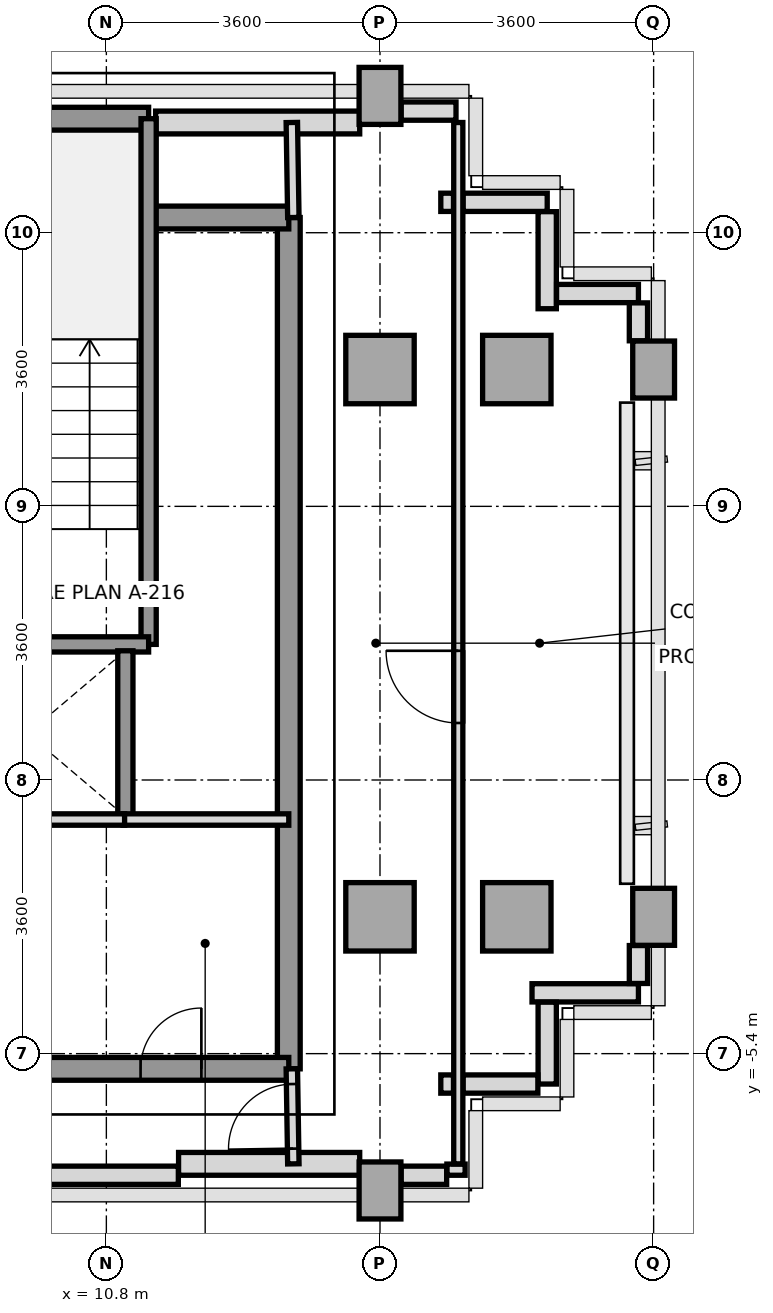
"""IFC4 building model, lengths in metres.
Left out: names, types, materials, properties, quantities, classifications, styles, units other than length and angle.
Written with IfcOpenShell. Run it as: python <this file> out.ifc"""

import sys

from ifc_helpers import new_model, si_unit, direction, frame, frame_2d, origin, origin_2d, place, context, subcontext, project, spatial, rectangle, extrude, source, transform, mapped, element, fill, save


model = new_model("IFC4")
c1 = context("Model", 3, precision=1e-05, world=origin(), true_north=direction((0.0, 1.0)))
c2 = subcontext(c1, "Body", "Model", "MODEL_VIEW")
j1 = project(units=[si_unit("LENGTHUNIT", "METRE"), si_unit("PLANEANGLEUNIT", "RADIAN")], contexts=[c1])
p1 = place(None, origin())
s1 = spatial("IfcSite", under=j1, at=p1, CompositionType="ELEMENT")
p2 = place(p1, origin())
s2 = spatial("IfcBuilding", under=s1, at=p2, CompositionType="ELEMENT")
p3 = place(p2, frame((0.0, 0.0, 233.2)))
s3 = spatial("IfcBuildingStorey", under=s2, at=p3, CompositionType="ELEMENT", Elevation=233.2)
m1 = source(origin(), c2, "Body", "SweptSolid", [
    extrude(rectangle(XDim=0.55, YDim=0.75, at=origin_2d()), origin(), (0.0, 0.0, 1.0), 3.01),
])
p4 = place(p3, frame((14.4, -7.2, 0.0), z_axis=(0.0, 0.0, 1.0), x_axis=(1.0, 0.0, 0.0)))
e1 = element("IfcColumn", 1, at=p4, inside=s3, PredefinedType="COLUMN", context=c2, shape_type="MappedRepresentation", body=[
    mapped(m1, transform((0.0, 0.0, 0.0), x_axis=(1.0, 0.0, 0.0), y_axis=(0.0, 1.0, 0.0), z_axis=(0.0, 0.0, 1.0), scale=1.0)),
])
m2 = source(origin(), c2, "Body", "SweptSolid", [
    extrude(rectangle(XDim=0.9, YDim=0.9, at=origin_2d()), origin(), (0.0, 0.0, 1.0), 3.01),
])
for number, where, z_axis, x_axis in (
    (2, (14.4, -3.6, 0.0), (0.0, 0.0, 1.0), (1.0, 0.0, 0.0)),
    (3, (14.4, 3.6, 0.0), (0.0, 0.0, 1.0), (1.0, 0.0, 0.0)),
):
    element("IfcColumn", number, at=place(p3, frame(where, z_axis=z_axis, x_axis=x_axis)), inside=s3, PredefinedType="COLUMN", context=c2, shape_type="MappedRepresentation", body=[
        mapped(m2, transform((0.0, 0.0, 0.0), x_axis=(1.0, 0.0, 0.0), y_axis=(0.0, 1.0, 0.0), z_axis=(0.0, 0.0, 1.0), scale=1.0)),
    ])
p5 = place(p3, frame((14.4, 7.2, 0.0), z_axis=(0.0, 0.0, 1.0), x_axis=(1.0, 0.0, 0.0)))
e4 = element("IfcColumn", 4, at=p5, inside=s3, PredefinedType="COLUMN", context=c2, shape_type="MappedRepresentation", body=[
    mapped(m1, transform((0.0, 0.0, 0.0), x_axis=(1.0, 0.0, 0.0), y_axis=(0.0, 1.0, 0.0), z_axis=(0.0, 0.0, 1.0), scale=1.0)),
])
for number, where, z_axis, x_axis in (
    (5, (16.2, -3.6, 0.0), (0.0, 0.0, 1.0), (1.0, 0.0, 0.0)),
    (6, (16.2, 3.6, 0.0), (0.0, 0.0, 1.0), (1.0, 0.0, 0.0)),
):
    element("IfcColumn", number, at=place(p3, frame(where, z_axis=z_axis, x_axis=x_axis)), inside=s3, PredefinedType="COLUMN", context=c2, shape_type="MappedRepresentation", body=[
        mapped(m2, transform((0.0, 0.0, 0.0), x_axis=(1.0, 0.0, 0.0), y_axis=(0.0, 1.0, 0.0), z_axis=(0.0, 0.0, 1.0), scale=1.0)),
    ])
for number, where, z_axis, x_axis in (
    (7, (18.0, -3.6, 0.0), (0.0, 0.0, 1.0), (1.0, 0.0, 0.0)),
    (8, (18.0, 3.6, 0.0), (0.0, 0.0, 1.0), (1.0, 0.0, 0.0)),
):
    element("IfcColumn", number, at=place(p3, frame(where, z_axis=z_axis, x_axis=x_axis)), inside=s3, PredefinedType="COLUMN", context=c2, shape_type="MappedRepresentation", body=[
        mapped(m1, transform((0.0, 0.0, 0.0), x_axis=(1.0, 0.0, 0.0), y_axis=(0.0, 1.0, 0.0), z_axis=(0.0, 0.0, 1.0), scale=1.0)),
    ])
p6 = place(p3, frame((11.448, 6.85, 0.0), z_axis=(0.0, 0.0, 1.0), x_axis=(1.0, 0.0, 0.0)))
e9 = element("IfcWall", 9, at=p6, inside=s3, PredefinedType="SOLIDWALL", context=c2, shape_type="SweptSolid", body=[
    extrude(rectangle(XDim=2.685, YDim=0.3, at=frame_2d((1.343, 0.0))), origin(), (0.0, 0.0, 1.0), 2.57),
])
p7 = place(p3, frame((11.75, -6.85, 0.0), z_axis=(0.0, 0.0, 1.0), x_axis=(1.0, 0.0, 0.0)))
e10 = element("IfcWall", 10, at=p7, inside=s3, PredefinedType="SOLIDWALL", context=c2, shape_type="SweptSolid", body=[
    extrude(rectangle(XDim=2.383, YDim=0.3, at=frame_2d((1.191, 0.0))), origin(), (0.0, 0.0, 1.0), 2.57),
])
p8 = place(p3, frame((17.8, -4.6, 0.0), z_axis=(0.0, 0.0, 1.0), x_axis=(-1.0, 0.0, 0.0)))
e11 = element("IfcWall", 11, at=p8, inside=s3, PredefinedType="PARAPET", context=c2, shape_type="SweptSolid", body=[
    extrude(rectangle(XDim=1.4, YDim=0.24, at=frame_2d((0.7, 0.0))), origin(), (0.0, 0.0, 1.0), 1.15),
])
p9 = place(p3, frame((16.6, -4.723, 0.0), z_axis=(0.0, 0.0, 1.0), x_axis=(0.0, -1.0, 0.0)))
e12 = element("IfcWall", 12, at=p9, inside=s3, PredefinedType="PARAPET", context=c2, shape_type="SweptSolid", body=[
    extrude(rectangle(XDim=1.077, YDim=0.24, at=frame_2d((0.539, 0.0))), origin(), (0.0, 0.0, 1.0), 1.15),
])
p10 = place(p3, frame((16.477, -5.8, 0.0), z_axis=(0.0, 0.0, 1.0), x_axis=(-1.0, 0.0, 0.0)))
e13 = element("IfcWall", 13, at=p10, inside=s3, PredefinedType="PARAPET", context=c2, shape_type="SweptSolid", body=[
    extrude(rectangle(XDim=0.984, YDim=0.24, at=frame_2d((0.492, 0.0))), origin(), (0.0, 0.0, 1.0), 1.15),
])
p11 = place(p3, frame((15.367, -5.8, 0.0), z_axis=(0.0, 0.0, 1.0), x_axis=(-1.0, 0.0, 0.0)))
e14 = element("IfcWall", 14, at=p11, inside=s3, PredefinedType="PARAPET", context=c2, shape_type="SweptSolid", body=[
    extrude(rectangle(XDim=0.167, YDim=0.24, at=frame_2d((0.083, 0.0))), origin(), (0.0, 0.0, 1.0), 1.15),
])
p12 = place(p3, frame((15.4, -6.853, 0.0), z_axis=(0.0, 0.0, 1.0), x_axis=(0.0, -1.0, 0.0)))
e15 = element("IfcWall", 15, at=p12, inside=s3, PredefinedType="PARAPET", context=c2, shape_type="SweptSolid", body=[
    extrude(rectangle(XDim=0.147, YDim=0.24, at=frame_2d((0.073, 0.0))), origin(), (0.0, 0.0, 1.0), 1.15),
])
p13 = place(p3, frame((15.277, -7.0, 0.0), z_axis=(0.0, 0.0, 1.0), x_axis=(-1.0, 0.0, 0.0)))
e16 = element("IfcWall", 16, at=p13, inside=s3, PredefinedType="PARAPET", context=c2, shape_type="SweptSolid", body=[
    extrude(rectangle(XDim=0.599, YDim=0.24, at=frame_2d((0.3, 0.0))), origin(), (0.0, 0.0, 1.0), 1.15),
])
p14 = place(p3, frame((11.747, -7.0, 0.0), z_axis=(0.0, 0.0, 1.0), x_axis=(-1.0, 0.0, 0.0)))
e17 = element("IfcWall", 17, at=p14, inside=s3, PredefinedType="PARAPET", context=c2, shape_type="SweptSolid", body=[
    extrude(rectangle(XDim=2.469, YDim=0.24, at=frame_2d((1.234, 0.0))), origin(), (0.0, 0.0, 1.0), 1.15),
])
p15 = place(p3, frame((14.678, 7.0, 0.0), z_axis=(0.0, 0.0, 1.0), x_axis=(1.0, 0.0, 0.0)))
e18 = element("IfcWall", 18, at=p15, inside=s3, PredefinedType="PARAPET", context=c2, shape_type="SweptSolid", body=[
    extrude(rectangle(XDim=0.722, YDim=0.24, at=frame_2d((0.361, 0.0))), origin(), (0.0, 0.0, 1.0), 1.15),
])
p16 = place(p3, frame((15.2, 5.8, 0.0), z_axis=(0.0, 0.0, 1.0), x_axis=(1.0, 0.0, 0.0)))
e19 = element("IfcWall", 19, at=p16, inside=s3, PredefinedType="PARAPET", context=c2, shape_type="SweptSolid", body=[
    extrude(rectangle(XDim=0.167, YDim=0.24, at=frame_2d((0.083, 0.0))), origin(), (0.0, 0.0, 1.0), 1.15),
])
p17 = place(p3, frame((15.493, 5.8, 0.0), z_axis=(0.0, 0.0, 1.0), x_axis=(1.0, 0.0, 0.0)))
e20 = element("IfcWall", 20, at=p17, inside=s3, PredefinedType="PARAPET", context=c2, shape_type="SweptSolid", body=[
    extrude(rectangle(XDim=1.107, YDim=0.24, at=frame_2d((0.554, 0.0))), origin(), (0.0, 0.0, 1.0), 1.15),
])
p18 = place(p3, frame((16.6, 5.677, 0.0), z_axis=(0.0, 0.0, 1.0), x_axis=(0.0, -1.0, 0.0)))
e21 = element("IfcWall", 21, at=p18, inside=s3, PredefinedType="PARAPET", context=c2, shape_type="SweptSolid", body=[
    extrude(rectangle(XDim=1.277, YDim=0.24, at=frame_2d((0.639, 0.0))), origin(), (0.0, 0.0, 1.0), 1.15),
])
p19 = place(p3, frame((16.723, 4.6, 0.0), z_axis=(0.0, 0.0, 1.0), x_axis=(1.0, 0.0, 0.0)))
e22 = element("IfcWall", 22, at=p19, inside=s3, PredefinedType="PARAPET", context=c2, shape_type="SweptSolid", body=[
    extrude(rectangle(XDim=1.077, YDim=0.24, at=frame_2d((0.539, 0.0))), origin(), (0.0, 0.0, 1.0), 1.15),
])
for number, where, z_axis, x_axis in (
    (23, (17.8, 4.477, 0.0), (0.0, 0.0, 1.0), (0.0, -1.0, 0.0)),
    (24, (17.8, -3.978, 0.0), (0.0, 0.0, 1.0), (0.0, -1.0, 0.0)),
):
    element("IfcWall", number, at=place(p3, frame(where, z_axis=z_axis, x_axis=x_axis)), inside=s3, PredefinedType="PARAPET", context=c2, shape_type="SweptSolid", body=[
        extrude(rectangle(XDim=0.499, YDim=0.24, at=frame_2d((0.25, 0.0))), origin(), (0.0, 0.0, 1.0), 1.15),
    ])
p20 = place(p3, frame((13.2, -5.6, 0.0), z_axis=(0.0, 0.0, 1.0), x_axis=(0.0, 1.0, 0.0)))
e25 = element("IfcWall", 25, at=p20, inside=s3, PredefinedType="SHEAR", context=c2, shape_type="SweptSolid", body=[
    extrude(rectangle(XDim=11.2, YDim=0.3, at=frame_2d((5.6, 0.0))), origin(), (0.0, 0.0, 1.0), 3.01),
])
p21 = place(p3, frame((5.4, 6.9, 0.0), z_axis=(0.0, 0.0, 1.0), x_axis=(1.0, 0.0, 0.0)))
e26 = element("IfcWall", 26, at=p21, inside=s3, PredefinedType="SHEAR", context=c2, shape_type="SweptSolid", body=[
    extrude(rectangle(XDim=5.956, YDim=0.3, at=frame_2d((2.978, 0.0))), origin(), (0.0, 0.0, 1.0), 3.01),
])
p22 = place(p3, frame((11.356, 5.6, 0.0), z_axis=(0.0, 0.0, 1.0), x_axis=(1.0, 0.0, 0.0)))
e27 = element("IfcWall", 27, at=p22, inside=s3, PredefinedType="SHEAR", context=c2, shape_type="SweptSolid", body=[
    extrude(rectangle(XDim=1.844, YDim=0.3, at=frame_2d((0.922, 0.0))), origin(), (0.0, 0.0, 1.0), 3.01),
])
p23 = place(p3, frame((5.4, -5.6, 0.0), z_axis=(0.0, 0.0, 1.0), x_axis=(1.0, 0.0, 0.0)))
e28 = element("IfcWall", 28, at=p23, inside=s3, PredefinedType="SHEAR", context=c2, shape_type="SweptSolid", body=[
    extrude(rectangle(XDim=7.8, YDim=0.3, at=frame_2d((3.9, 0.0))), origin(), (0.0, 0.0, 1.0), 3.01),
])
p24 = place(p23, frame((5.85, 0.0, 0.0)))
e29 = element("IfcOpeningElement", 29, at=p24, cuts=e28, PredefinedType="OPENING", context=c2, shape_type="SweptSolid", body=[
    extrude(rectangle(XDim=0.8, YDim=2.1, at=frame_2d((0.4, 1.05))), frame((0.0, 0.16, 0.0), z_axis=(0.0, -1.0, 0.0), x_axis=(1.0, 0.0, 0.0)), (0.0, 0.0, 1.0), 0.32),
])
p25 = place(p23, frame((3.4, 0.0, 0.0)))
e30 = element("IfcOpeningElement", 30, at=p25, cuts=e28, PredefinedType="OPENING", context=c2, shape_type="SweptSolid", body=[
    extrude(rectangle(XDim=0.95, YDim=2.15, at=frame_2d((0.475, 1.075))), frame((0.0, 0.16, 0.0), z_axis=(0.0, -1.0, 0.0), x_axis=(1.0, 0.0, 0.0)), (0.0, 0.0, 1.0), 0.32),
])
p26 = place(p3, frame((11.356, -0.016, 0.0), z_axis=(0.0, 0.0, 1.0), x_axis=(0.0, 1.0, 0.0)))
e31 = element("IfcWall", 31, at=p26, inside=s3, PredefinedType="SOLIDWALL", context=c2, shape_type="SweptSolid", body=[
    extrude(rectangle(XDim=6.916, YDim=0.2, at=frame_2d((3.458, 0.0))), origin(), (0.0, 0.0, 1.0), 3.01),
])
p27 = place(p3, frame((8.204, -0.016, 0.0), z_axis=(0.0, 0.0, 1.0), x_axis=(1.0, 0.0, 0.0)))
e32 = element("IfcWall", 32, at=p27, inside=s3, PredefinedType="SOLIDWALL", context=c2, shape_type="SweptSolid", body=[
    extrude(rectangle(XDim=3.152, YDim=0.2, at=frame_2d((1.576, 0.0))), origin(), (0.0, 0.0, 1.0), 3.01),
])
p28 = place(p3, frame((11.05, -2.28, 0.0), z_axis=(0.0, 0.0, 1.0), x_axis=(0.0, 1.0, 0.0)))
e33 = element("IfcWall", 33, at=p28, inside=s3, PredefinedType="SOLIDWALL", context=c2, shape_type="SweptSolid", body=[
    extrude(rectangle(XDim=2.18, YDim=0.2, at=frame_2d((1.09, 0.0))), origin(), (0.0, 0.0, 1.0), 3.01),
])
p29 = place(p3, frame((11.02, -2.32, 0.0), z_axis=(0.0, 0.0, 1.0), x_axis=(1.0, 0.0, 0.0)))
e34 = element("IfcWall", 34, at=p29, inside=s3, PredefinedType="PARTITIONING", context=c2, shape_type="SweptSolid", body=[
    extrude(rectangle(XDim=2.18, YDim=0.15, at=frame_2d((1.09, 0.0))), origin(), (0.0, 0.0, 1.0), 3.01),
])
p30 = place(p3, frame((8.48, -2.32, 0.0), z_axis=(0.0, 0.0, 1.0), x_axis=(1.0, 0.0, 0.0)))
e35 = element("IfcWall", 35, at=p30, inside=s3, PredefinedType="PARTITIONING", context=c2, shape_type="SweptSolid", body=[
    extrude(rectangle(XDim=2.56, YDim=0.15, at=frame_2d((1.28, 0.0))), origin(), (0.0, 0.0, 1.0), 3.01),
])
p31 = place(p3, frame((13.26, 5.6, 0.0), z_axis=(0.0, 0.0, 1.0), x_axis=(-0.016013571389, 0.999871774545, 0.0)))
e36 = element("IfcWall", 36, at=p31, inside=s3, PredefinedType="PARTITIONING", context=c2, shape_type="SweptSolid", body=[
    extrude(rectangle(XDim=1.25, YDim=0.15, at=frame_2d((0.625, 0.0))), origin(), (0.0, 0.0, 1.0), 3.01),
])
p32 = place(p3, frame((13.26, -6.85, 0.0), z_axis=(0.0, 0.0, 1.0), x_axis=(-0.016013571389, 0.999871774545, 0.0)))
e37 = element("IfcWall", 37, at=p32, inside=s3, PredefinedType="PARTITIONING", context=c2, shape_type="SweptSolid", body=[
    extrude(rectangle(XDim=1.25, YDim=0.15, at=frame_2d((0.625, 0.0))), origin(), (0.0, 0.0, 1.0), 3.01),
])
p33 = place(p32, frame((0.2, 0.0, 0.0)))
e38 = element("IfcOpeningElement", 38, at=p33, cuts=e37, PredefinedType="OPENING", context=c2, shape_type="SweptSolid", body=[
    extrude(rectangle(XDim=0.85, YDim=2.1, at=frame_2d((0.425, 1.05))), frame((0.0, 0.085, 0.0), z_axis=(0.0, -1.0, 0.0), x_axis=(1.0, 0.0, 0.0)), (0.0, 0.0, 1.0), 0.17),
])
p34 = place(p3, frame((15.43, -6.85, 0.0), z_axis=(0.0, 0.0, 1.0), x_axis=(0.0, 1.0, 0.0)))
e39 = element("IfcWall", 39, at=p34, inside=s3, PredefinedType="PARTITIONING", context=c2, shape_type="SweptSolid", body=[
    extrude(rectangle(XDim=13.7, YDim=0.12, at=frame_2d((6.85, 0.0))), origin(), (0.0, 0.0, 1.0), 3.01),
])
p35 = place(p34, frame((5.8, 0.0, 0.0)))
e40 = element("IfcOpeningElement", 40, at=p35, cuts=e39, PredefinedType="OPENING", context=c2, shape_type="SweptSolid", body=[
    extrude(rectangle(XDim=0.95, YDim=2.15, at=frame_2d((0.475, 1.075))), frame((0.0, 0.07, 0.0), z_axis=(0.0, -1.0, 0.0), x_axis=(1.0, 0.0, 0.0)), (0.0, 0.0, 1.0), 0.14),
])
m3 = source(origin(), c2, "Body", "SweptSolid", [
    extrude(rectangle(XDim=0.8, YDim=2.1, at=frame_2d((0.4, 1.05))), frame((0.0, 0.025, 0.0), z_axis=(0.0, -1.0, 0.0), x_axis=(1.0, 0.0, 0.0)), (0.0, 0.0, 1.0), 0.05),
])
p36 = place(p24, origin())
e41 = element("IfcDoor", 41, at=p36, inside=s3, OperationType="SINGLE_SWING_RIGHT", PredefinedType="DOOR", context=c2, shape_type="MappedRepresentation", body=[
    mapped(m3, transform((0.0, 0.0, 0.0), x_axis=(1.0, 0.0, 0.0), y_axis=(0.0, 1.0, 0.0), z_axis=(0.0, 0.0, 1.0), scale=1.0)),
])
fill(e29, e41)
m4 = source(origin(), c2, "Body", "SweptSolid", [
    extrude(rectangle(XDim=0.85, YDim=2.1, at=frame_2d((0.425, 1.05))), frame((0.0, 0.025, 0.0), z_axis=(0.0, -1.0, 0.0), x_axis=(1.0, 0.0, 0.0)), (0.0, 0.0, 1.0), 0.05),
])
p37 = place(p33, origin())
e42 = element("IfcDoor", 42, at=p37, inside=s3, OperationType="SINGLE_SWING_LEFT", PredefinedType="DOOR", context=c2, shape_type="MappedRepresentation", body=[
    mapped(m4, transform((0.0, 0.0, 0.0), x_axis=(1.0, 0.0, 0.0), y_axis=(0.0, 1.0, 0.0), z_axis=(0.0, 0.0, 1.0), scale=1.0)),
])
fill(e38, e42)
m5 = source(origin(), c2, "Body", "SweptSolid", [
    extrude(rectangle(XDim=0.95, YDim=2.15, at=frame_2d((0.475, 1.075))), frame((0.0, 0.025, 0.0), z_axis=(0.0, -1.0, 0.0), x_axis=(1.0, 0.0, 0.0)), (0.0, 0.0, 1.0), 0.05),
])
p38 = place(p35, origin())
e43 = element("IfcDoor", 43, at=p38, inside=s3, OperationType="SINGLE_SWING_RIGHT", PredefinedType="DOOR", context=c2, shape_type="MappedRepresentation", body=[
    mapped(m5, transform((0.0, 0.0, 0.0), x_axis=(1.0, 0.0, 0.0), y_axis=(0.0, 1.0, 0.0), z_axis=(0.0, 0.0, 1.0), scale=1.0)),
])
fill(e40, e43)
save(model, sys.argv[1])
